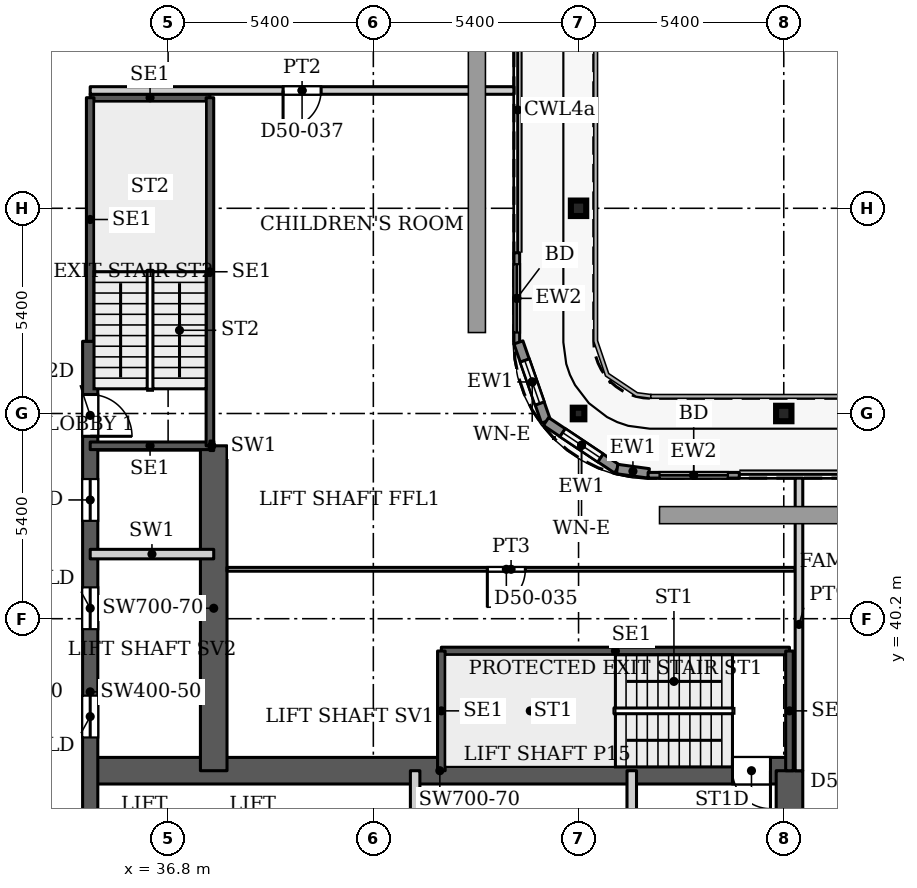
"""IFC4 building model, lengths in metres.
Left out: names, types, materials, properties, quantities, classifications, styles, units other than length and angle.
Written with IfcOpenShell. Run it as: python <this file> out.ifc"""

import sys

from ifc_helpers import new_model, si_unit, direction, frame, frame_2d, origin, origin_2d, place, context, subcontext, project, spatial, rectangle, hollow_rectangle, i_section, extrude, source, transform, mapped, element, fill, save


model = new_model("IFC4")
c1 = context("Model", 3, precision=1e-05, world=origin(), true_north=direction((0.0, 1.0)))
c2 = subcontext(c1, "Body", "Model", "MODEL_VIEW")
j1 = project(units=[si_unit("LENGTHUNIT", "METRE"), si_unit("PLANEANGLEUNIT", "RADIAN")], contexts=[c1])
p1 = place(None, origin())
s1 = spatial("IfcSite", under=j1, at=p1, CompositionType="ELEMENT")
p2 = place(p1, origin())
s2 = spatial("IfcBuilding", under=s1, at=p2, CompositionType="ELEMENT")
p3 = place(p2, frame((0.0, 0.0, 216.2)))
s3 = spatial("IfcBuildingStorey", under=s2, at=p3, CompositionType="ELEMENT", Elevation=216.2)
for number, where, z_axis, x_axis in (
    (1, (53.0, 45.6, 0.0), (0.0, 0.0, 1.0), (1.0, 0.0, 0.0)),
    (2, (47.6, 51.0, 0.0), (0.0, 0.0, 1.0), (1.0, 0.0, 0.0)),
):
    element("IfcColumn", number, at=place(p3, frame(where, z_axis=z_axis, x_axis=x_axis)), inside=s3, PredefinedType="COLUMN", context=c2, shape_type="SweptSolid", body=[
        extrude(i_section(OverallWidth=0.404, OverallDepth=0.407, WebThickness=0.027, FlangeThickness=0.044, FilletRadius=0.012, at=origin_2d()), origin(), (0.0, 0.0, 1.0), 3.9),
    ])
p4 = place(p3, frame((47.6, 45.6, 0.0), z_axis=(0.0, 0.0, 1.0), x_axis=(1.0, 0.0, 0.0)))
e3 = element("IfcColumn", 3, at=p4, inside=s3, PredefinedType="COLUMN", context=c2, shape_type="SweptSolid", body=[
    extrude(hollow_rectangle(XDim=0.305, YDim=0.305, WallThickness=0.016, InnerFilletRadius=0.016, OuterFilletRadius=0.032, at=origin_2d()), origin(), (0.0, 0.0, 1.0), 3.9),
])
p5 = place(p3, frame((34.75, 36.2, 0.0), z_axis=(0.0, 0.0, 1.0), x_axis=(1.0, 0.0, 0.0)))
e4 = element("IfcWall", 4, at=p5, inside=s3, PredefinedType="SHEAR", context=c2, shape_type="SweptSolid", body=[
    extrude(rectangle(XDim=18.4, YDim=0.7, at=frame_2d((9.2, 0.0))), origin(), (0.0, 0.0, 1.0), 3.9),
])
p6 = place(p5, frame((16.9, 0.0, 0.0)))
e5 = element("IfcOpeningElement", 5, at=p6, cuts=e4, PredefinedType="OPENING", context=c2, shape_type="SweptSolid", body=[
    extrude(rectangle(XDim=1.0, YDim=2.2, at=frame_2d((0.5, 1.1))), frame((0.0, 0.36, 0.0), z_axis=(0.0, -1.0, 0.0), x_axis=(1.0, 0.0, 0.0)), (0.0, 0.0, 1.0), 0.72),
])
p7 = place(p3, frame((34.75, 29.05, 0.0), z_axis=(0.0, 0.0, 1.0), x_axis=(0.0, 1.0, 0.0)))
e6 = element("IfcWall", 6, at=p7, inside=s3, PredefinedType="SHEAR", context=c2, shape_type="SweptSolid", body=[
    extrude(rectangle(XDim=18.45, YDim=0.4, at=frame_2d((9.225, 0.0))), origin(), (0.0, 0.0, 1.0), 3.9),
])
p8 = place(p7, frame((8.025, 0.0, 0.0)))
e7 = element("IfcOpeningElement", 7, at=p8, cuts=e6, PredefinedType="OPENING", context=c2, shape_type="SweptSolid", body=[
    extrude(rectangle(XDim=1.1, YDim=2.2, at=frame_2d((0.55, 1.1))), frame((0.0, 0.21, 0.0), z_axis=(0.0, -1.0, 0.0), x_axis=(1.0, 0.0, 0.0)), (0.0, 0.0, 1.0), 0.42),
])
p9 = place(p7, frame((10.875, 0.0, 0.0)))
e8 = element("IfcOpeningElement", 8, at=p9, cuts=e6, PredefinedType="OPENING", context=c2, shape_type="SweptSolid", body=[
    extrude(rectangle(XDim=1.1, YDim=2.2, at=frame_2d((0.55, 1.1))), frame((0.0, 0.21, 0.0), z_axis=(0.0, -1.0, 0.0), x_axis=(1.0, 0.0, 0.0)), (0.0, 0.0, 1.0), 0.42),
])
p10 = place(p7, frame((13.725, 0.0, 0.0)))
e9 = element("IfcOpeningElement", 9, at=p10, cuts=e6, PredefinedType="OPENING", context=c2, shape_type="SweptSolid", body=[
    extrude(rectangle(XDim=1.1, YDim=2.2, at=frame_2d((0.55, 1.1))), frame((0.0, 0.21, 0.0), z_axis=(0.0, -1.0, 0.0), x_axis=(1.0, 0.0, 0.0)), (0.0, 0.0, 1.0), 0.42),
])
p11 = place(p7, frame((15.95, 0.0, 0.0)))
e10 = element("IfcOpeningElement", 10, at=p11, cuts=e6, PredefinedType="OPENING", context=c2, shape_type="SweptSolid", body=[
    extrude(rectangle(XDim=1.1, YDim=2.2, at=frame_2d((0.55, 1.1))), frame((0.0, 0.21, 0.0), z_axis=(0.0, -1.0, 0.0), x_axis=(1.0, 0.0, 0.0)), (0.0, 0.0, 1.0), 0.42),
])
p12 = place(p3, frame((38.0, 36.2, 0.0), z_axis=(0.0, 0.0, 1.0), x_axis=(0.0, 1.0, 0.0)))
e11 = element("IfcWall", 11, at=p12, inside=s3, PredefinedType="SHEAR", context=c2, shape_type="SweptSolid", body=[
    extrude(rectangle(XDim=8.55, YDim=0.7, at=frame_2d((4.275, 0.0))), origin(), (0.0, 0.0, 1.0), 3.9),
])
p13 = place(p3, frame((53.15, 25.8, 0.0), z_axis=(0.0, 0.0, 1.0), x_axis=(0.0, 1.0, 0.0)))
e12 = element("IfcWall", 12, at=p13, inside=s3, PredefinedType="SHEAR", context=c2, shape_type="SweptSolid", body=[
    extrude(rectangle(XDim=10.4, YDim=0.7, at=frame_2d((5.2, 0.0))), origin(), (0.0, 0.0, 1.0), 3.9),
])
p14 = place(p3, frame((45.975, 49.83, 0.0), z_axis=(0.0, 0.0, 1.0), x_axis=(0.0, -1.0, 0.0)))
e13 = element("IfcWall", 13, at=p14, inside=s3, PredefinedType="SOLIDWALL", context=c2, shape_type="SweptSolid", body=[
    extrude(rectangle(XDim=2.4, YDim=0.15, at=frame_2d((1.2, 0.0))), origin(), (0.0, 0.0, 1.0), 3.75),
])
p15 = place(p14, frame((0.3, 0.0, 0.0)))
e14 = element("IfcOpeningElement", 14, at=p15, cuts=e13, PredefinedType="OPENING", context=c2, shape_type="SweptSolid", body=[
    extrude(rectangle(XDim=1.8, YDim=2.4, at=frame_2d((0.9, 1.2))), frame((0.0, 0.085, 0.0), z_axis=(0.0, -1.0, 0.0), x_axis=(1.0, 0.0, 0.0)), (0.0, 0.0, 1.0), 0.17),
])
p16 = place(p3, frame((46.018, 47.471, 0.0), z_axis=(0.0, 0.0, 1.0), x_axis=(0.328791208903, -0.944402637093, 0.0)))
e15 = element("IfcWall", 15, at=p16, inside=s3, PredefinedType="SOLIDWALL", context=c2, shape_type="SweptSolid", body=[
    extrude(rectangle(XDim=2.205, YDim=0.25, at=frame_2d((1.102, 0.0))), origin(), (0.0, 0.0, 1.0), 3.75),
])
p17 = place(p16, frame((0.503, 0.0, 0.6)))
e16 = element("IfcOpeningElement", 16, at=p17, cuts=e15, PredefinedType="OPENING", context=c2, shape_type="SweptSolid", body=[
    extrude(rectangle(XDim=1.2, YDim=2.1, at=frame_2d((0.6, 1.05))), frame((0.0, 0.135, 0.0), z_axis=(0.0, -1.0, 0.0), x_axis=(1.0, 0.0, 0.0)), (0.0, 0.0, 1.0), 0.27),
])
p18 = place(p3, frame((46.743, 45.389, 0.0), z_axis=(0.0, 0.0, 1.0), x_axis=(0.831449265529, -0.555600682912, 0.0)))
e17 = element("IfcWall", 17, at=p18, inside=s3, PredefinedType="SOLIDWALL", context=c2, shape_type="SweptSolid", body=[
    extrude(rectangle(XDim=2.251, YDim=0.25, at=frame_2d((1.126, 0.0))), origin(), (0.0, 0.0, 1.0), 3.75),
])
p19 = place(p18, frame((0.525, 0.0, 0.6)))
e18 = element("IfcOpeningElement", 18, at=p19, cuts=e17, PredefinedType="OPENING", context=c2, shape_type="SweptSolid", body=[
    extrude(rectangle(XDim=1.2, YDim=2.1, at=frame_2d((0.6, 1.05))), frame((0.0, 0.135, 0.0), z_axis=(0.0, -1.0, 0.0), x_axis=(1.0, 0.0, 0.0)), (0.0, 0.0, 1.0), 0.27),
])
p20 = place(p3, frame((48.615, 44.138, 0.0), z_axis=(0.0, 0.0, 1.0), x_axis=(0.990741504246, -0.135761819977, 0.0)))
e19 = element("IfcWall", 19, at=p20, inside=s3, PredefinedType="SOLIDWALL", context=c2, shape_type="SweptSolid", body=[
    extrude(rectangle(XDim=0.84, YDim=0.25, at=frame_2d((0.42, 0.0))), origin(), (0.0, 0.0, 1.0), 3.75),
])
p21 = place(p3, frame((49.43, 43.975, 0.0), z_axis=(0.0, 0.0, 1.0), x_axis=(1.0, 0.0, 0.0)))
e20 = element("IfcWall", 20, at=p21, inside=s3, PredefinedType="SOLIDWALL", context=c2, shape_type="SweptSolid", body=[
    extrude(rectangle(XDim=2.4, YDim=0.15, at=frame_2d((1.2, 0.0))), origin(), (0.0, 0.0, 1.0), 3.75),
])
p22 = place(p21, frame((0.3, 0.0, 0.0)))
e21 = element("IfcOpeningElement", 21, at=p22, cuts=e20, PredefinedType="OPENING", context=c2, shape_type="SweptSolid", body=[
    extrude(rectangle(XDim=1.8, YDim=2.4, at=frame_2d((0.9, 1.2))), frame((0.0, 0.085, 0.0), z_axis=(0.0, -1.0, 0.0), x_axis=(1.0, 0.0, 0.0)), (0.0, 0.0, 1.0), 0.17),
])
p23 = place(p3, frame((43.99, 39.35, 0.0), z_axis=(0.0, 0.0, 1.0), x_axis=(1.0, 0.0, 0.0)))
e22 = element("IfcWall", 22, at=p23, inside=s3, PredefinedType="SHEAR", context=c2, shape_type="SweptSolid", body=[
    extrude(rectangle(XDim=9.16, YDim=0.2, at=frame_2d((4.58, 0.0))), origin(), (0.0, 0.0, 1.0), 3.9),
])
for number, where, z_axis, x_axis in (
    (23, (43.99, 36.2, 0.0), (0.0, 0.0, 1.0), (0.0, 1.0, 0.0)),
    (24, (53.15, 36.2, 0.0), (0.0, 0.0, 1.0), (0.0, 1.0, 0.0)),
):
    element("IfcWall", number, at=place(p3, frame(where, z_axis=z_axis, x_axis=x_axis)), inside=s3, PredefinedType="SHEAR", context=c2, shape_type="SweptSolid", body=[
        extrude(rectangle(XDim=3.15, YDim=0.2, at=frame_2d((1.575, 0.0))), origin(), (0.0, 0.0, 1.0), 3.9),
    ])
for number, where, z_axis, x_axis in (
    (25, (34.75, 44.75, 0.0), (0.0, 0.0, 1.0), (1.0, 0.0, 0.0)),
    (26, (34.75, 53.91, 0.0), (0.0, 0.0, 1.0), (1.0, 0.0, 0.0)),
):
    element("IfcWall", number, at=place(p3, frame(where, z_axis=z_axis, x_axis=x_axis)), inside=s3, PredefinedType="SHEAR", context=c2, shape_type="SweptSolid", body=[
        extrude(rectangle(XDim=3.15, YDim=0.2, at=frame_2d((1.575, 0.0))), origin(), (0.0, 0.0, 1.0), 3.9),
    ])
p24 = place(p3, frame((34.75, 47.5, 0.0), z_axis=(0.0, 0.0, 1.0), x_axis=(0.0, 1.0, 0.0)))
e27 = element("IfcWall", 27, at=p24, inside=s3, PredefinedType="SHEAR", context=c2, shape_type="SweptSolid", body=[
    extrude(rectangle(XDim=6.41, YDim=0.2, at=frame_2d((3.205, 0.0))), origin(), (0.0, 0.0, 1.0), 3.9),
])
p25 = place(p3, frame((37.9, 44.75, 0.0), z_axis=(0.0, 0.0, 1.0), x_axis=(0.0, 1.0, 0.0)))
e28 = element("IfcWall", 28, at=p25, inside=s3, PredefinedType="SHEAR", context=c2, shape_type="SweptSolid", body=[
    extrude(rectangle(XDim=9.16, YDim=0.2, at=frame_2d((4.58, 0.0))), origin(), (0.0, 0.0, 1.0), 3.9),
])
for number, where, z_axis, x_axis in (
    (29, (43.3, 32.95, 0.0), (0.0, 0.0, 1.0), (0.0, 1.0, 0.0)),
    (30, (49.0, 32.95, 0.0), (0.0, 0.0, 1.0), (0.0, 1.0, 0.0)),
    (31, (34.75, 41.9, 0.0), (0.0, 0.0, 1.0), (1.0, 0.0, 0.0)),
):
    element("IfcWall", number, at=place(p3, frame(where, z_axis=z_axis, x_axis=x_axis)), inside=s3, PredefinedType="PARTITIONING", context=c2, shape_type="SweptSolid", body=[
        extrude(rectangle(XDim=3.25, YDim=0.25, at=frame_2d((1.625, 0.0))), origin(), (0.0, 0.0, 1.0), 3.9),
    ])
p26 = place(p3, frame((37.9, 44.75, 0.0), z_axis=(0.0, 0.0, 1.0), x_axis=(1.0, 0.0, 0.0)))
e32 = element("IfcWall", 32, at=p26, inside=s3, PredefinedType="PARTITIONING", context=c2, shape_type="SweptSolid", body=[
    extrude(rectangle(XDim=0.1, YDim=0.25, at=frame_2d((0.05, 0.0))), origin(), (0.0, 0.0, 1.0), 3.9),
])
p27 = place(p3, frame((34.75, 54.1, 0.0), z_axis=(0.0, 0.0, 1.0), x_axis=(1.0, 0.0, 0.0)))
e33 = element("IfcWall", 33, at=p27, inside=s3, PredefinedType="PARTITIONING", context=c2, shape_type="SweptSolid", body=[
    extrude(rectangle(XDim=11.15, YDim=0.2, at=frame_2d((5.575, 0.0))), origin(), (0.0, 0.0, 1.0), 3.6),
])
p28 = place(p27, frame((5.075, 0.0, 0.0)))
e34 = element("IfcOpeningElement", 34, at=p28, cuts=e33, PredefinedType="OPENING", context=c2, shape_type="SweptSolid", body=[
    extrude(rectangle(XDim=1.0, YDim=2.1, at=frame_2d((0.5, 1.05))), frame((0.0, 0.11, 0.0), z_axis=(0.0, -1.0, 0.0), x_axis=(1.0, 0.0, 0.0)), (0.0, 0.0, 1.0), 0.22),
])
p29 = place(p3, frame((38.349, 41.5, 0.0), z_axis=(0.0, 0.0, 1.0), x_axis=(1.0, 0.0, 0.0)))
e35 = element("IfcWall", 35, at=p29, inside=s3, PredefinedType="PARTITIONING", context=c2, shape_type="SweptSolid", body=[
    extrude(rectangle(XDim=14.951, YDim=0.1, at=frame_2d((7.476, 0.0))), origin(), (0.0, 0.0, 1.0), 3.6),
])
p30 = place(p29, frame((6.851, 0.0, 0.0)))
e36 = element("IfcOpeningElement", 36, at=p30, cuts=e35, PredefinedType="OPENING", context=c2, shape_type="SweptSolid", body=[
    extrude(rectangle(XDim=1.0, YDim=2.1, at=frame_2d((0.5, 1.05))), frame((0.0, 0.06, 0.0), z_axis=(0.0, -1.0, 0.0), x_axis=(1.0, 0.0, 0.0)), (0.0, 0.0, 1.0), 0.12),
])
p31 = place(p3, frame((53.4, 36.199, 0.0), z_axis=(0.0, 0.0, 1.0), x_axis=(0.0, 1.0, 0.0)))
e37 = element("IfcWall", 37, at=p31, inside=s3, PredefinedType="PARTITIONING", context=c2, shape_type="SweptSolid", body=[
    extrude(rectangle(XDim=7.701, YDim=0.2, at=frame_2d((3.851, 0.0))), origin(), (0.0, 0.0, 1.0), 3.6),
])
m1 = source(origin(), c2, "Body", "SweptSolid", [
    extrude(rectangle(XDim=1.8, YDim=2.4, at=frame_2d((0.9, 1.2))), frame((0.0, 0.025, 0.0), z_axis=(0.0, -1.0, 0.0), x_axis=(1.0, 0.0, 0.0)), (0.0, 0.0, 1.0), 0.05),
])
p32 = place(p15, origin())
e38 = element("IfcDoor", 38, at=p32, inside=s3, OperationType="SLIDING_TO_LEFT", PredefinedType="DOOR", context=c2, shape_type="MappedRepresentation", body=[
    mapped(m1, transform((0.0, 0.0, 0.0), x_axis=(1.0, 0.0, 0.0), y_axis=(0.0, 1.0, 0.0), z_axis=(0.0, 0.0, 1.0), scale=1.0)),
])
fill(e14, e38)
m2 = source(origin(), c2, "Body", "SweptSolid", [
    extrude(rectangle(XDim=1.2, YDim=2.1, at=frame_2d((0.6, 1.05))), frame((0.0, 0.03, 0.0), z_axis=(0.0, -1.0, 0.0), x_axis=(1.0, 0.0, 0.0)), (0.0, 0.0, 1.0), 0.06),
])
p33 = place(p17, origin())
e39 = element("IfcWindow", 39, at=p33, inside=s3, PartitioningType="SINGLE_PANEL", PredefinedType="WINDOW", context=c2, shape_type="MappedRepresentation", body=[
    mapped(m2, transform((0.0, 0.0, 0.0), x_axis=(1.0, 0.0, 0.0), y_axis=(0.0, 1.0, 0.0), z_axis=(0.0, 0.0, 1.0), scale=1.0)),
])
fill(e16, e39)
p34 = place(p19, origin())
e40 = element("IfcWindow", 40, at=p34, inside=s3, PartitioningType="SINGLE_PANEL", PredefinedType="WINDOW", context=c2, shape_type="MappedRepresentation", body=[
    mapped(m2, transform((0.0, 0.0, 0.0), x_axis=(1.0, 0.0, 0.0), y_axis=(0.0, 1.0, 0.0), z_axis=(0.0, 0.0, 1.0), scale=1.0)),
])
fill(e18, e40)
p35 = place(p22, origin())
e41 = element("IfcDoor", 41, at=p35, inside=s3, OperationType="SLIDING_TO_LEFT", PredefinedType="DOOR", context=c2, shape_type="MappedRepresentation", body=[
    mapped(m1, transform((0.0, 0.0, 0.0), x_axis=(1.0, 0.0, 0.0), y_axis=(0.0, 1.0, 0.0), z_axis=(0.0, 0.0, 1.0), scale=1.0)),
])
fill(e21, e41)
m3 = source(origin(), c2, "Body", "SweptSolid", [
    extrude(rectangle(XDim=1.1, YDim=2.2, at=frame_2d((0.55, 1.1))), frame((0.0, 0.025, 0.0), z_axis=(0.0, -1.0, 0.0), x_axis=(1.0, 0.0, 0.0)), (0.0, 0.0, 1.0), 0.05),
])
p36 = place(p8, origin())
e42 = element("IfcDoor", 42, at=p36, inside=s3, OperationType="SLIDING_TO_LEFT", PredefinedType="DOOR", context=c2, shape_type="MappedRepresentation", body=[
    mapped(m3, transform((0.0, 0.0, 0.0), x_axis=(1.0, 0.0, 0.0), y_axis=(0.0, 1.0, 0.0), z_axis=(0.0, 0.0, 1.0), scale=1.0)),
])
fill(e7, e42)
p37 = place(p9, origin())
e43 = element("IfcDoor", 43, at=p37, inside=s3, OperationType="SLIDING_TO_LEFT", PredefinedType="DOOR", context=c2, shape_type="MappedRepresentation", body=[
    mapped(m3, transform((0.0, 0.0, 0.0), x_axis=(1.0, 0.0, 0.0), y_axis=(0.0, 1.0, 0.0), z_axis=(0.0, 0.0, 1.0), scale=1.0)),
])
fill(e8, e43)
p38 = place(p10, origin())
e44 = element("IfcDoor", 44, at=p38, inside=s3, OperationType="SLIDING_TO_LEFT", PredefinedType="DOOR", context=c2, shape_type="MappedRepresentation", body=[
    mapped(m3, transform((0.0, 0.0, 0.0), x_axis=(1.0, 0.0, 0.0), y_axis=(0.0, 1.0, 0.0), z_axis=(0.0, 0.0, 1.0), scale=1.0)),
])
fill(e9, e44)
m4 = source(origin(), c2, "Body", "SweptSolid", [
    extrude(rectangle(XDim=1.0, YDim=2.2, at=frame_2d((0.5, 1.1))), frame((0.0, 0.025, 0.0), z_axis=(0.0, -1.0, 0.0), x_axis=(1.0, 0.0, 0.0)), (0.0, 0.0, 1.0), 0.05),
])
p39 = place(p6, origin())
e45 = element("IfcDoor", 45, at=p39, inside=s3, OperationType="SINGLE_SWING_RIGHT", PredefinedType="DOOR", context=c2, shape_type="MappedRepresentation", body=[
    mapped(m4, transform((0.0, 0.0, 0.0), x_axis=(1.0, 0.0, 0.0), y_axis=(0.0, 1.0, 0.0), z_axis=(0.0, 0.0, 1.0), scale=1.0)),
])
fill(e5, e45)
m5 = source(origin(), c2, "Body", "SweptSolid", [
    extrude(rectangle(XDim=1.1, YDim=2.2, at=frame_2d((0.55, 1.1))), frame((0.0, 0.025, 0.0), z_axis=(0.0, -1.0, 0.0), x_axis=(1.0, 0.0, 0.0)), (0.0, 0.0, 1.0), 0.05),
])
p40 = place(p11, origin())
e46 = element("IfcDoor", 46, at=p40, inside=s3, OperationType="SINGLE_SWING_RIGHT", PredefinedType="DOOR", context=c2, shape_type="MappedRepresentation", body=[
    mapped(m5, transform((0.0, 0.0, 0.0), x_axis=(1.0, 0.0, 0.0), y_axis=(0.0, 1.0, 0.0), z_axis=(0.0, 0.0, 1.0), scale=1.0)),
])
fill(e10, e46)
m6 = source(origin(), c2, "Body", "SweptSolid", [
    extrude(rectangle(XDim=1.0, YDim=2.1, at=frame_2d((0.5, 1.05))), frame((0.0, 0.025, 0.0), z_axis=(0.0, -1.0, 0.0), x_axis=(1.0, 0.0, 0.0)), (0.0, 0.0, 1.0), 0.05),
])
p41 = place(p30, origin())
e47 = element("IfcDoor", 47, at=p41, inside=s3, OperationType="SINGLE_SWING_RIGHT", PredefinedType="DOOR", context=c2, shape_type="MappedRepresentation", body=[
    mapped(m6, transform((0.0, 0.0, 0.0), x_axis=(1.0, 0.0, 0.0), y_axis=(0.0, 1.0, 0.0), z_axis=(0.0, 0.0, 1.0), scale=1.0)),
])
fill(e36, e47)
m7 = source(origin(), c2, "Body", "SweptSolid", [
    extrude(rectangle(XDim=1.0, YDim=2.1, at=frame_2d((0.5, 1.05))), frame((0.0, 0.025, 0.0), z_axis=(0.0, -1.0, 0.0), x_axis=(1.0, 0.0, 0.0)), (0.0, 0.0, 1.0), 0.05),
])
p42 = place(p28, origin())
e48 = element("IfcDoor", 48, at=p42, inside=s3, OperationType="SINGLE_SWING_RIGHT", PredefinedType="DOOR", context=c2, shape_type="MappedRepresentation", body=[
    mapped(m7, transform((0.0, 0.0, 0.0), x_axis=(1.0, 0.0, 0.0), y_axis=(0.0, 1.0, 0.0), z_axis=(0.0, 0.0, 1.0), scale=1.0)),
])
fill(e34, e48)
save(model, sys.argv[1])
